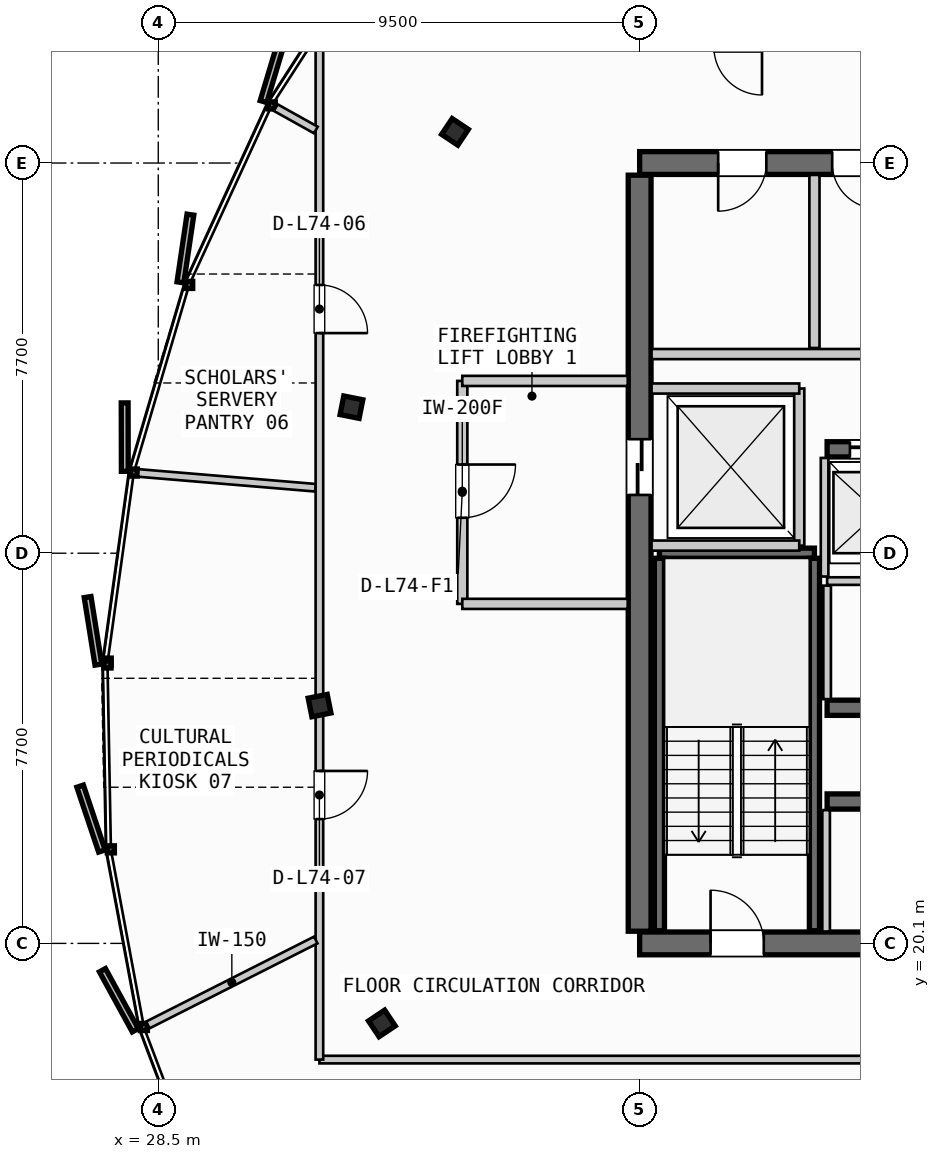
"""IFC4 building model, lengths in metres.
Left out: names, types, materials, properties, quantities, classifications, styles, units other than length and angle.
Written with IfcOpenShell. Run it as: python <this file> out.ifc"""

import sys

from ifc_helpers import new_model, si_unit, direction, frame, frame_2d, origin, origin_2d, place, context, subcontext, project, spatial, rectangle, i_section, extrude, source, transform, mapped, element, fill, save


model = new_model("IFC4")
c1 = context("Model", 3, precision=1e-05, world=origin(), true_north=direction((0.0, 1.0)))
c2 = subcontext(c1, "Body", "Model", "MODEL_VIEW")
j1 = project(units=[si_unit("LENGTHUNIT", "METRE"), si_unit("PLANEANGLEUNIT", "RADIAN")], contexts=[c1])
p1 = place(None, origin())
s1 = spatial("IfcSite", under=j1, at=p1, CompositionType="ELEMENT")
p2 = place(p1, origin())
s2 = spatial("IfcBuilding", under=s1, at=p2, CompositionType="ELEMENT")
p3 = place(p2, frame((0.0, 0.0, 280.15)))
s3 = spatial("IfcBuildingStorey", under=s2, at=p3, CompositionType="ELEMENT", Elevation=280.15)
p4 = place(p3, frame((38.0, 20.1, 0.0), z_axis=(0.0, 0.0, 1.0), x_axis=(1.0, 0.0, 0.0)))
e1 = element("IfcWall", 1, at=p4, inside=s3, PredefinedType="SHEAR", context=c2, shape_type="SweptSolid", body=[
    extrude(rectangle(XDim=17.6, YDim=0.45, at=frame_2d((8.8, 0.0))), origin(), (0.0, 0.0, 1.0), 3.21),
])
p5 = place(p4, frame((1.4, 0.0, 0.0)))
e2 = element("IfcOpeningElement", 2, at=p5, cuts=e1, PredefinedType="OPENING", context=c2, shape_type="SweptSolid", body=[
    extrude(rectangle(XDim=1.05, YDim=2.15, at=frame_2d((0.525, 1.075))), frame((0.0, 0.235, 0.0), z_axis=(0.0, -1.0, 0.0), x_axis=(1.0, 0.0, 0.0)), (0.0, 0.0, 1.0), 0.47),
])
p6 = place(p4, frame((15.15, 0.0, 0.0)))
e3 = element("IfcOpeningElement", 3, at=p6, cuts=e1, PredefinedType="OPENING", context=c2, shape_type="SweptSolid", body=[
    extrude(rectangle(XDim=1.05, YDim=2.15, at=frame_2d((0.525, 1.075))), frame((0.0, 0.235, 0.0), z_axis=(0.0, -1.0, 0.0), x_axis=(1.0, 0.0, 0.0)), (0.0, 0.0, 1.0), 0.47),
])
p7 = place(p4, frame((5.25, 0.0, 0.0)))
e4 = element("IfcOpeningElement", 4, at=p7, cuts=e1, PredefinedType="OPENING", context=c2, shape_type="SweptSolid", body=[
    extrude(rectangle(XDim=0.9, YDim=2.15, at=frame_2d((0.45, 1.075))), frame((0.0, 0.235, 0.0), z_axis=(0.0, -1.0, 0.0), x_axis=(1.0, 0.0, 0.0)), (0.0, 0.0, 1.0), 0.47),
])
p8 = place(p4, frame((11.4, 0.0, 0.0)))
e5 = element("IfcOpeningElement", 5, at=p8, cuts=e1, PredefinedType="OPENING", context=c2, shape_type="SweptSolid", body=[
    extrude(rectangle(XDim=0.95, YDim=2.15, at=frame_2d((0.475, 1.075))), frame((0.0, 0.235, 0.0), z_axis=(0.0, -1.0, 0.0), x_axis=(1.0, 0.0, 0.0)), (0.0, 0.0, 1.0), 0.47),
])
p9 = place(p3, frame((55.6, 35.5, 0.0), z_axis=(0.0, 0.0, 1.0), x_axis=(-1.0, 0.0, 0.0)))
e6 = element("IfcWall", 6, at=p9, inside=s3, PredefinedType="SHEAR", context=c2, shape_type="SweptSolid", body=[
    extrude(rectangle(XDim=17.6, YDim=0.45, at=frame_2d((8.8, 0.0))), origin(), (0.0, 0.0, 1.0), 3.21),
])
p10 = place(p9, frame((8.05, 0.0, 0.0)))
e7 = element("IfcOpeningElement", 7, at=p10, cuts=e6, PredefinedType="OPENING", context=c2, shape_type="SweptSolid", body=[
    extrude(rectangle(XDim=1.5, YDim=2.2, at=frame_2d((0.75, 1.1))), frame((0.0, 0.235, 0.0), z_axis=(0.0, -1.0, 0.0), x_axis=(1.0, 0.0, 0.0)), (0.0, 0.0, 1.0), 0.47),
])
p11 = place(p9, frame((15.1, 0.0, 0.0)))
e8 = element("IfcOpeningElement", 8, at=p11, cuts=e6, PredefinedType="OPENING", context=c2, shape_type="SweptSolid", body=[
    extrude(rectangle(XDim=0.95, YDim=2.15, at=frame_2d((0.475, 1.075))), frame((0.0, 0.235, 0.0), z_axis=(0.0, -1.0, 0.0), x_axis=(1.0, 0.0, 0.0)), (0.0, 0.0, 1.0), 0.47),
])
p12 = place(p9, frame((12.9, 0.0, 0.0)))
e9 = element("IfcOpeningElement", 9, at=p12, cuts=e6, PredefinedType="OPENING", context=c2, shape_type="SweptSolid", body=[
    extrude(rectangle(XDim=0.9, YDim=2.15, at=frame_2d((0.45, 1.075))), frame((0.0, 0.235, 0.0), z_axis=(0.0, -1.0, 0.0), x_axis=(1.0, 0.0, 0.0)), (0.0, 0.0, 1.0), 0.47),
])
p13 = place(p9, frame((10.6, 0.0, 0.0)))
e10 = element("IfcOpeningElement", 10, at=p13, cuts=e6, PredefinedType="OPENING", context=c2, shape_type="SweptSolid", body=[
    extrude(rectangle(XDim=0.95, YDim=2.15, at=frame_2d((0.475, 1.075))), frame((0.0, 0.235, 0.0), z_axis=(0.0, -1.0, 0.0), x_axis=(1.0, 0.0, 0.0)), (0.0, 0.0, 1.0), 0.47),
])
p14 = place(p3, frame((38.0, 35.26, 0.0), z_axis=(0.0, 0.0, 1.0), x_axis=(0.0, -1.0, 0.0)))
e11 = element("IfcWall", 11, at=p14, inside=s3, PredefinedType="SHEAR", context=c2, shape_type="SweptSolid", body=[
    extrude(rectangle(XDim=14.92, YDim=0.45, at=frame_2d((7.46, 0.0))), origin(), (0.0, 0.0, 1.0), 3.21),
])
p15 = place(p14, frame((5.21, 0.0, 0.0)))
e12 = element("IfcOpeningElement", 12, at=p15, cuts=e11, PredefinedType="OPENING", context=c2, shape_type="SweptSolid", body=[
    extrude(rectangle(XDim=1.1, YDim=2.2, at=frame_2d((0.55, 1.1))), frame((0.0, 0.235, 0.0), z_axis=(0.0, -1.0, 0.0), x_axis=(1.0, 0.0, 0.0)), (0.0, 0.0, 1.0), 0.47),
])
p16 = place(p3, frame((41.7, 22.9, 0.0), z_axis=(0.0, 0.0, 1.0), x_axis=(1.0, 0.0, 0.0)))
e13 = element("IfcWall", 13, at=p16, inside=s3, PredefinedType="SHEAR", context=c2, shape_type="SweptSolid", body=[
    extrude(rectangle(XDim=4.25, YDim=0.3, at=frame_2d((2.125, 0.0))), origin(), (0.0, 0.0, 1.0), 3.21),
])
p17 = place(p3, frame((41.7, 24.75, 0.0), z_axis=(0.0, 0.0, 1.0), x_axis=(1.0, 0.0, 0.0)))
e14 = element("IfcWall", 14, at=p17, inside=s3, PredefinedType="SHEAR", context=c2, shape_type="SweptSolid", body=[
    extrude(rectangle(XDim=4.25, YDim=0.3, at=frame_2d((2.125, 0.0))), origin(), (0.0, 0.0, 1.0), 3.21),
])
p18 = place(p17, frame((1.55, 0.0, 0.0)))
e15 = element("IfcOpeningElement", 15, at=p18, cuts=e14, PredefinedType="OPENING", context=c2, shape_type="SweptSolid", body=[
    extrude(rectangle(XDim=0.95, YDim=2.15, at=frame_2d((0.475, 1.075))), frame((0.0, 0.16, 0.0), z_axis=(0.0, -1.0, 0.0), x_axis=(1.0, 0.0, 0.0)), (0.0, 0.0, 1.0), 0.32),
])
p19 = place(p3, frame((41.7, 29.85, 0.0), z_axis=(0.0, 0.0, 1.0), x_axis=(1.0, 0.0, 0.0)))
e16 = element("IfcWall", 16, at=p19, inside=s3, PredefinedType="SHEAR", context=c2, shape_type="SweptSolid", body=[
    extrude(rectangle(XDim=4.25, YDim=0.3, at=frame_2d((2.125, 0.0))), origin(), (0.0, 0.0, 1.0), 3.21),
])
p20 = place(p19, frame((0.45, 0.0, 0.0)))
e17 = element("IfcOpeningElement", 17, at=p20, cuts=e16, PredefinedType="OPENING", context=c2, shape_type="SweptSolid", body=[
    extrude(rectangle(XDim=1.1, YDim=2.2, at=frame_2d((0.55, 1.1))), frame((0.0, 0.16, 0.0), z_axis=(0.0, -1.0, 0.0), x_axis=(1.0, 0.0, 0.0)), (0.0, 0.0, 1.0), 0.32),
])
p21 = place(p19, frame((2.5, 0.0, 0.0)))
e18 = element("IfcOpeningElement", 18, at=p21, cuts=e16, PredefinedType="OPENING", context=c2, shape_type="SweptSolid", body=[
    extrude(rectangle(XDim=1.1, YDim=2.2, at=frame_2d((0.55, 1.1))), frame((0.0, 0.16, 0.0), z_axis=(0.0, -1.0, 0.0), x_axis=(1.0, 0.0, 0.0)), (0.0, 0.0, 1.0), 0.32),
])
m1 = source(origin(), c2, "Body", "SweptSolid", [
    extrude(i_section(OverallWidth=0.374, OverallDepth=0.383, WebThickness=0.017, FlangeThickness=0.026, FilletRadius=0.015, at=origin_2d()), origin(), (0.0, 0.0, 1.0), 3.21),
])
for number, where, z_axis, x_axis in (
    (19, (34.356, 36.115, 0.0), (0.0, 0.0, 1.0), (-0.831, 0.556, 0.0)),
    (20, (32.312, 30.682, 0.0), (0.0, 0.0, 1.0), (-0.981, 0.195, 0.0)),
    (21, (31.683, 24.793, 0.0), (0.0, 0.0, 1.0), (-0.981, -0.195, 0.0)),
    (22, (32.913, 18.521, 0.0), (0.0, 0.0, 1.0), (-0.831, -0.556, 0.0)),
):
    element("IfcColumn", number, at=place(p3, frame(where, z_axis=z_axis, x_axis=x_axis)), inside=s3, PredefinedType="COLUMN", context=c2, shape_type="MappedRepresentation", body=[
        mapped(m1, transform((0.0, 0.0, 0.0), scale=1.0)),
    ])
p22 = place(p3, frame((38.39, 27.8, 0.0), z_axis=(0.0, 0.0, 1.0), x_axis=(1.0, 0.0, 0.0)))
e23 = element("IfcWall", 23, at=p22, inside=s3, PredefinedType="SHEAR", context=c2, shape_type="SweptSolid", body=[
    extrude(rectangle(XDim=3.06, YDim=0.2, at=frame_2d((1.53, 0.0))), origin(), (0.0, 0.0, 1.0), 3.21),
])
for number, where, z_axis, x_axis in (
    (24, (41.45, 27.7, 0.0), (0.0, 0.0, 1.0), (0.0, -1.0, 0.0)),
    (25, (38.39, 20.35, 0.0), (0.0, 0.0, 1.0), (0.0, 1.0, 0.0)),
):
    element("IfcWall", number, at=place(p3, frame(where, z_axis=z_axis, x_axis=x_axis)), inside=s3, PredefinedType="SHEAR", context=c2, shape_type="SweptSolid", body=[
        extrude(rectangle(XDim=7.35, YDim=0.2, at=frame_2d((3.675, 0.0))), origin(), (0.0, 0.0, 1.0), 3.21),
    ])
p23 = place(p3, frame((41.15, 27.95, 0.0), z_axis=(0.0, 0.0, 1.0), x_axis=(0.0, 1.0, 0.0)))
e26 = element("IfcWall", 26, at=p23, inside=s3, PredefinedType="PARTITIONING", context=c2, shape_type="SweptSolid", body=[
    extrude(rectangle(XDim=3.1, YDim=0.2, at=frame_2d((1.55, 0.0))), origin(), (0.0, 0.0, 1.0), 2.455),
])
for number, where, z_axis, x_axis in (
    (27, (38.235, 27.95, 0.0), (0.0, 0.0, 1.0), (1.0, 0.0, 0.0)),
    (28, (38.235, 31.05, 0.0), (0.0, 0.0, 1.0), (1.0, 0.0, 0.0)),
):
    element("IfcWall", number, at=place(p3, frame(where, z_axis=z_axis, x_axis=x_axis)), inside=s3, PredefinedType="PARTITIONING", context=c2, shape_type="SweptSolid", body=[
        extrude(rectangle(XDim=2.915, YDim=0.2, at=frame_2d((1.458, 0.0))), origin(), (0.0, 0.0, 1.0), 2.455),
    ])
p24 = place(p3, frame((34.5, 31.2, 0.0), z_axis=(0.0, 0.0, 1.0), x_axis=(0.0, -1.0, 0.0)))
e29 = element("IfcWall", 29, at=p24, inside=s3, PredefinedType="PARTITIONING", context=c2, shape_type="SweptSolid", body=[
    extrude(rectangle(XDim=4.4, YDim=0.2, at=frame_2d((2.2, 0.0))), origin(), (0.0, 0.0, 1.0), 2.455),
])
p25 = place(p24, frame((1.65, 0.0, 0.0)))
e30 = element("IfcOpeningElement", 30, at=p25, cuts=e29, PredefinedType="OPENING", context=c2, shape_type="SweptSolid", body=[
    extrude(rectangle(XDim=1.05, YDim=2.15, at=frame_2d((0.525, 1.075))), frame((0.0, 0.11, 0.0), z_axis=(0.0, -1.0, 0.0), x_axis=(1.0, 0.0, 0.0)), (0.0, 0.0, 1.0), 0.22),
])
for number, where, z_axis, x_axis in (
    (31, (34.5, 26.8, 0.0), (0.0, 0.0, 1.0), (1.0, 0.0, 0.0)),
    (32, (34.5, 31.2, 0.0), (0.0, 0.0, 1.0), (1.0, 0.0, 0.0)),
):
    element("IfcWall", number, at=place(p3, frame(where, z_axis=z_axis, x_axis=x_axis)), inside=s3, PredefinedType="PARTITIONING", context=c2, shape_type="SweptSolid", body=[
        extrude(rectangle(XDim=3.265, YDim=0.2, at=frame_2d((1.632, 0.0))), origin(), (0.0, 0.0, 1.0), 2.455),
    ])
p26 = place(p3, frame((41.68, 20.335, 0.0), z_axis=(0.0, 0.0, 1.0), x_axis=(0.0, 1.0, 0.0)))
e33 = element("IfcWall", 33, at=p26, inside=s3, PredefinedType="PARTITIONING", context=c2, shape_type="SweptSolid", body=[
    extrude(rectangle(XDim=2.395, YDim=0.15, at=frame_2d((1.198, 0.0))), origin(), (0.0, 0.0, 1.0), 2.455),
])
p27 = place(p3, frame((41.7, 27.25, 0.0), z_axis=(0.0, 0.0, 1.0), x_axis=(1.0, 0.0, 0.0)))
e34 = element("IfcWall", 34, at=p27, inside=s3, PredefinedType="PARTITIONING", context=c2, shape_type="SweptSolid", body=[
    extrude(rectangle(XDim=4.25, YDim=0.15, at=frame_2d((2.125, 0.0))), origin(), (0.0, 0.0, 1.0), 2.455),
])
p28 = place(p3, frame((41.7, 24.92, 0.0), z_axis=(0.0, 0.0, 1.0), x_axis=(0.0, 1.0, 0.0)))
e35 = element("IfcWall", 35, at=p28, inside=s3, PredefinedType="PARTITIONING", context=c2, shape_type="SweptSolid", body=[
    extrude(rectangle(XDim=2.24, YDim=0.15, at=frame_2d((1.12, 0.0))), origin(), (0.0, 0.0, 1.0), 2.455),
])
p29 = place(p3, frame((41.65, 27.34, 0.0), z_axis=(0.0, 0.0, 1.0), x_axis=(0.0, 1.0, 0.0)))
e36 = element("IfcWall", 36, at=p29, inside=s3, PredefinedType="PARTITIONING", context=c2, shape_type="SweptSolid", body=[
    extrude(rectangle(XDim=2.34, YDim=0.15, at=frame_2d((1.17, 0.0))), origin(), (0.0, 0.0, 1.0), 2.455),
])
p30 = place(p3, frame((41.45, 31.85, 0.0), z_axis=(0.0, 0.0, 1.0), x_axis=(0.0, 1.0, 0.0)))
e37 = element("IfcWall", 37, at=p30, inside=s3, PredefinedType="PARTITIONING", context=c2, shape_type="SweptSolid", body=[
    extrude(rectangle(XDim=3.415, YDim=0.2, at=frame_2d((1.708, 0.0))), origin(), (0.0, 0.0, 1.0), 2.455),
])
p31 = place(p3, frame((38.235, 31.73, 0.0), z_axis=(0.0, 0.0, 1.0), x_axis=(1.0, 0.0, 0.0)))
e38 = element("IfcWall", 38, at=p31, inside=s3, PredefinedType="PARTITIONING", context=c2, shape_type="SweptSolid", body=[
    extrude(rectangle(XDim=7.565, YDim=0.2, at=frame_2d((3.782, 0.0))), origin(), (0.0, 0.0, 1.0), 2.455),
])
p32 = place(p3, frame((31.68, 17.807, 0.0), z_axis=(0.0, 0.0, 1.0), x_axis=(1.0, 0.0, 0.0)))
e39 = element("IfcWall", 39, at=p32, inside=s3, PredefinedType="PARTITIONING", context=c2, shape_type="SweptSolid", body=[
    extrude(rectangle(XDim=28.87, YDim=0.15, at=frame_2d((14.435, 0.0))), origin(), (0.0, 0.0, 1.0), 2.455),
])
p33 = place(p32, frame((13.209, 0.0, 0.0)))
e40 = element("IfcOpeningElement", 40, at=p33, cuts=e39, PredefinedType="OPENING", context=c2, shape_type="SweptSolid", body=[
    extrude(rectangle(XDim=0.95, YDim=2.15, at=frame_2d((0.475, 1.075))), frame((0.0, 0.085, 0.0), z_axis=(0.0, -1.0, 0.0), x_axis=(1.0, 0.0, 0.0)), (0.0, 0.0, 1.0), 0.17),
])
p34 = place(p3, frame((31.68, 37.793, 0.0), z_axis=(0.0, 0.0, 1.0), x_axis=(0.0, -1.0, 0.0)))
e41 = element("IfcWall", 41, at=p34, inside=s3, PredefinedType="PARTITIONING", context=c2, shape_type="SweptSolid", body=[
    extrude(rectangle(XDim=19.986, YDim=0.15, at=frame_2d((9.993, 0.0))), origin(), (0.0, 0.0, 1.0), 2.455),
])
p35 = place(p34, frame((4.699, 0.0, 0.0)))
e42 = element("IfcOpeningElement", 42, at=p35, cuts=e41, PredefinedType="OPENING", context=c2, shape_type="SweptSolid", body=[
    extrude(rectangle(XDim=0.95, YDim=2.15, at=frame_2d((0.475, 1.075))), frame((0.0, 0.085, 0.0), z_axis=(0.0, -1.0, 0.0), x_axis=(1.0, 0.0, 0.0)), (0.0, 0.0, 1.0), 0.17),
])
p36 = place(p34, frame((14.29, 0.0, 0.0)))
e43 = element("IfcOpeningElement", 43, at=p36, cuts=e41, PredefinedType="OPENING", context=c2, shape_type="SweptSolid", body=[
    extrude(rectangle(XDim=0.95, YDim=2.15, at=frame_2d((0.475, 1.075))), frame((0.0, 0.085, 0.0), z_axis=(0.0, -1.0, 0.0), x_axis=(1.0, 0.0, 0.0)), (0.0, 0.0, 1.0), 0.17),
])
p37 = place(p3, frame((31.609, 20.167, 0.0), z_axis=(0.0, 0.0, 1.0), x_axis=(-0.89233988313, -0.451364080289, 0.0)))
e44 = element("IfcWall", 44, at=p37, inside=s3, PredefinedType="PARTITIONING", context=c2, shape_type="SweptSolid", body=[
    extrude(rectangle(XDim=3.713, YDim=0.15, at=frame_2d((1.856, 0.0))), origin(), (0.0, 0.0, 1.0), 2.455),
])
p38 = place(p3, frame((31.61, 36.151, 0.0), z_axis=(0.0, 0.0, 1.0), x_axis=(-0.87313905588, 0.487471218736, 0.0)))
e45 = element("IfcWall", 45, at=p38, inside=s3, PredefinedType="PARTITIONING", context=c2, shape_type="SweptSolid", body=[
    extrude(rectangle(XDim=0.906, YDim=0.15, at=frame_2d((0.453, 0.0))), origin(), (0.0, 0.0, 1.0), 2.455),
])
p39 = place(p3, frame((31.6, 29.092, 0.0), z_axis=(0.0, 0.0, 1.0), x_axis=(-0.996524108066, 0.083304874065, 0.0)))
e46 = element("IfcWall", 46, at=p39, inside=s3, PredefinedType="PARTITIONING", context=c2, shape_type="SweptSolid", body=[
    extrude(rectangle(XDim=3.505, YDim=0.15, at=frame_2d((1.752, 0.0))), origin(), (0.0, 0.0, 1.0), 2.455),
])
m2 = source(origin(), c2, "Body", "SweptSolid", [
    extrude(rectangle(XDim=1.05, YDim=2.15, at=frame_2d((0.525, 1.075))), frame((0.0, 0.025, 0.0), z_axis=(0.0, -1.0, 0.0), x_axis=(1.0, 0.0, 0.0)), (0.0, 0.0, 1.0), 0.05),
])
p40 = place(p5, origin())
e47 = element("IfcDoor", 47, at=p40, inside=s3, OperationType="SINGLE_SWING_LEFT", PredefinedType="DOOR", context=c2, shape_type="MappedRepresentation", body=[
    mapped(m2, transform((0.0, 0.0, 0.0), scale=1.0)),
])
fill(e2, e47)
m3 = source(origin(), c2, "Body", "SweptSolid", [
    extrude(rectangle(XDim=1.1, YDim=2.2, at=frame_2d((0.55, 1.1))), frame((0.0, 0.025, 0.0), z_axis=(0.0, -1.0, 0.0), x_axis=(1.0, 0.0, 0.0)), (0.0, 0.0, 1.0), 0.05),
])
p41 = place(p15, origin())
e48 = element("IfcDoor", 48, at=p41, inside=s3, OperationType="SLIDING_TO_LEFT", PredefinedType="DOOR", context=c2, shape_type="MappedRepresentation", body=[
    mapped(m3, transform((0.0, 0.0, 0.0), scale=1.0)),
])
fill(e12, e48)
p42 = place(p20, origin())
e49 = element("IfcDoor", 49, at=p42, inside=s3, OperationType="SLIDING_TO_LEFT", PredefinedType="DOOR", context=c2, shape_type="MappedRepresentation", body=[
    mapped(m3, transform((0.0, 0.0, 0.0), scale=1.0)),
])
fill(e17, e49)
m4 = source(origin(), c2, "Body", "SweptSolid", [
    extrude(rectangle(XDim=0.95, YDim=2.15, at=frame_2d((0.475, 1.075))), frame((0.0, 0.025, 0.0), z_axis=(0.0, -1.0, 0.0), x_axis=(1.0, 0.0, 0.0)), (0.0, 0.0, 1.0), 0.05),
])
p43 = place(p11, origin())
e50 = element("IfcDoor", 50, at=p43, inside=s3, OperationType="SINGLE_SWING_RIGHT", PredefinedType="DOOR", context=c2, shape_type="MappedRepresentation", body=[
    mapped(m4, transform((0.0, 0.0, 0.0), scale=1.0)),
])
fill(e8, e50)
m5 = source(origin(), c2, "Body", "SweptSolid", [
    extrude(rectangle(XDim=0.9, YDim=2.15, at=frame_2d((0.45, 1.075))), frame((0.0, 0.025, 0.0), z_axis=(0.0, -1.0, 0.0), x_axis=(1.0, 0.0, 0.0)), (0.0, 0.0, 1.0), 0.05),
])
p44 = place(p12, origin())
e51 = element("IfcDoor", 51, at=p44, inside=s3, OperationType="SINGLE_SWING_LEFT", PredefinedType="DOOR", context=c2, shape_type="MappedRepresentation", body=[
    mapped(m5, transform((0.0, 0.0, 0.0), scale=1.0)),
])
fill(e9, e51)
p45 = place(p25, origin())
e52 = element("IfcDoor", 52, at=p45, inside=s3, OperationType="SINGLE_SWING_LEFT", PredefinedType="DOOR", context=c2, shape_type="MappedRepresentation", body=[
    mapped(m2, transform((0.0, 0.0, 0.0), scale=1.0)),
])
fill(e30, e52)
p46 = place(p35, origin())
e53 = element("IfcDoor", 53, at=p46, inside=s3, OperationType="SINGLE_SWING_RIGHT", PredefinedType="DOOR", context=c2, shape_type="MappedRepresentation", body=[
    mapped(m4, transform((0.0, 0.0, 0.0), scale=1.0)),
])
fill(e42, e53)
p47 = place(p36, origin())
e54 = element("IfcDoor", 54, at=p47, inside=s3, OperationType="SINGLE_SWING_LEFT", PredefinedType="DOOR", context=c2, shape_type="MappedRepresentation", body=[
    mapped(m4, transform((0.0, 0.0, 0.0), scale=1.0)),
])
fill(e43, e54)
save(model, sys.argv[1])
